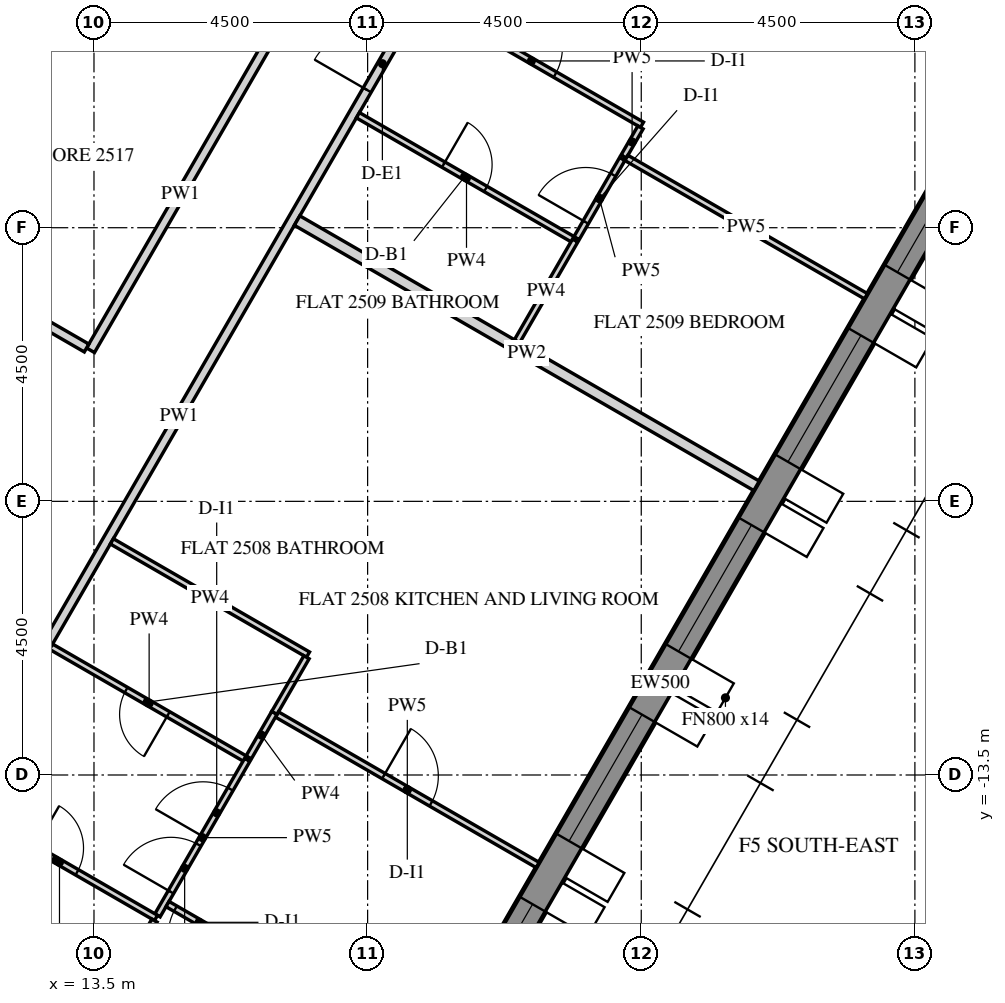
"""IFC4 building model, lengths in metres.
Left out: names, types, materials, properties, quantities, classifications, styles, units other than length and angle.
Written with IfcOpenShell. Run it as: python <this file> out.ifc"""

import sys

from ifc_helpers import new_model, si_unit, direction, frame, frame_2d, origin, place, context, subcontext, project, spatial, polyline, rectangle, outline, extrude, element, fill, save


model = new_model("IFC4")
c1 = context("Model", 3, precision=1e-05, world=origin(), true_north=direction((0.0, 1.0)))
c2 = subcontext(c1, "Body", "Model", "MODEL_VIEW")
j1 = project(units=[si_unit("LENGTHUNIT", "METRE"), si_unit("PLANEANGLEUNIT", "RADIAN")], contexts=[c1])
p1 = place(None, origin())
s1 = spatial("IfcSite", under=j1, at=p1, CompositionType="ELEMENT")
p2 = place(p1, origin())
s2 = spatial("IfcBuilding", under=s1, at=p2, CompositionType="ELEMENT")
p3 = place(p2, frame((0.0, 0.0, 314.7)))
s3 = spatial("IfcBuildingStorey", under=s2, at=p3, CompositionType="ELEMENT", Elevation=314.7)
p4 = place(p3, frame((16.451, -23.005, -0.15), z_axis=(0.0, 0.0, 1.0), x_axis=(0.500003737743, 0.866023245787, 0.0)))
e1 = element("IfcWall", 1, at=p4, inside=s3, PredefinedType="SOLIDWALL", context=c2, shape_type="SweptSolid", body=[
    extrude(outline(polyline([(-0.021, -0.25), (25.468, -0.25), (25.421, 0.25), (0.021, 0.25), (-0.021, -0.25)])), origin(), (0.0, 0.0, 1.0), 3.9),
])
p5 = place(p4, frame((2.522, 0.0, 0.75)))
e2 = element("IfcOpeningElement", 2, at=p5, cuts=e1, PredefinedType="OPENING", context=c2, shape_type="SweptSolid", body=[
    extrude(rectangle(XDim=2.4, YDim=2.7, at=frame_2d((1.2, 1.35))), frame((0.0, 0.26, 0.0), z_axis=(0.0, -1.0, 0.0), x_axis=(1.0, 0.0, 0.0)), (0.0, 0.0, 1.0), 0.52),
])
p6 = place(p4, frame((6.122, 0.0, 0.75)))
e3 = element("IfcOpeningElement", 3, at=p6, cuts=e1, PredefinedType="OPENING", context=c2, shape_type="SweptSolid", body=[
    extrude(rectangle(XDim=2.4, YDim=2.7, at=frame_2d((1.2, 1.35))), frame((0.0, 0.26, 0.0), z_axis=(0.0, -1.0, 0.0), x_axis=(1.0, 0.0, 0.0)), (0.0, 0.0, 1.0), 0.52),
])
p7 = place(p4, frame((9.722, 0.0, 0.75)))
e4 = element("IfcOpeningElement", 4, at=p7, cuts=e1, PredefinedType="OPENING", context=c2, shape_type="SweptSolid", body=[
    extrude(rectangle(XDim=2.4, YDim=2.7, at=frame_2d((1.2, 1.35))), frame((0.0, 0.26, 0.0), z_axis=(0.0, -1.0, 0.0), x_axis=(1.0, 0.0, 0.0)), (0.0, 0.0, 1.0), 0.52),
])
p8 = place(p4, frame((13.323, 0.0, 0.75)))
e5 = element("IfcOpeningElement", 5, at=p8, cuts=e1, PredefinedType="OPENING", context=c2, shape_type="SweptSolid", body=[
    extrude(rectangle(XDim=2.4, YDim=2.7, at=frame_2d((1.2, 1.35))), frame((0.0, 0.26, 0.0), z_axis=(0.0, -1.0, 0.0), x_axis=(1.0, 0.0, 0.0)), (0.0, 0.0, 1.0), 0.52),
])
p9 = place(p4, frame((16.922, 0.0, 0.75)))
e6 = element("IfcOpeningElement", 6, at=p9, cuts=e1, PredefinedType="OPENING", context=c2, shape_type="SweptSolid", body=[
    extrude(rectangle(XDim=2.4, YDim=2.7, at=frame_2d((1.2, 1.35))), frame((0.0, 0.26, 0.0), z_axis=(0.0, -1.0, 0.0), x_axis=(1.0, 0.0, 0.0)), (0.0, 0.0, 1.0), 0.52),
])
p10 = place(p4, frame((20.522, 0.0, 0.75)))
e7 = element("IfcOpeningElement", 7, at=p10, cuts=e1, PredefinedType="OPENING", context=c2, shape_type="SweptSolid", body=[
    extrude(rectangle(XDim=2.4, YDim=2.7, at=frame_2d((1.2, 1.35))), frame((0.0, 0.26, 0.0), z_axis=(0.0, -1.0, 0.0), x_axis=(1.0, 0.0, 0.0)), (0.0, 0.0, 1.0), 0.52),
])
p11 = place(p3, frame((6.351, -11.0, -0.15), z_axis=(0.0, 0.0, 1.0), x_axis=(0.499998894578, -0.866026041999, 0.0)))
e8 = element("IfcWall", 8, at=p11, inside=s3, PredefinedType="SHEAR", context=c2, shape_type="SweptSolid", body=[
    extrude(rectangle(XDim=15.544, YDim=0.4, at=frame_2d((7.772, 0.0))), origin(), (0.0, 0.0, 1.0), 3.9),
])
p12 = place(p11, frame((6.872, 0.0, 0.15)))
e9 = element("IfcOpeningElement", 9, at=p12, cuts=e8, PredefinedType="OPENING", context=c2, shape_type="SweptSolid", body=[
    extrude(rectangle(XDim=1.8, YDim=2.4, at=frame_2d((0.9, 1.2))), frame((0.0, 0.21, 0.0), z_axis=(0.0, -1.0, 0.0), x_axis=(1.0, 0.0, 0.0)), (0.0, 0.0, 1.0), 0.42),
])
p13 = place(p3, frame((11.229, -13.951, 0.0), z_axis=(0.0, 0.0, 1.0), x_axis=(0.499997948852, 0.866026588012, 0.0)))
e10 = element("IfcWall", 10, at=p13, inside=s3, PredefinedType="PARTITIONING", context=c2, shape_type="SweptSolid", body=[
    extrude(rectangle(XDim=14.677, YDim=0.15, at=frame_2d((7.339, 0.0))), origin(), (0.0, 0.0, 1.0), 2.988),
])
p14 = place(p13, frame((1.0, 0.0, 0.0)))
e11 = element("IfcOpeningElement", 11, at=p14, cuts=e10, PredefinedType="OPENING", context=c2, shape_type="SweptSolid", body=[
    extrude(rectangle(XDim=1.0, YDim=2.1, at=frame_2d((0.5, 1.05))), frame((0.0, 0.085, 0.0), z_axis=(0.0, -1.0, 0.0), x_axis=(1.0, 0.0, 0.0)), (0.0, 0.0, 1.0), 0.17),
])
p15 = place(p13, frame((13.527, 0.0, 0.0)))
e12 = element("IfcOpeningElement", 12, at=p15, cuts=e10, PredefinedType="OPENING", context=c2, shape_type="SweptSolid", body=[
    extrude(rectangle(XDim=1.0, YDim=2.1, at=frame_2d((0.5, 1.05))), frame((0.0, 0.085, 0.0), z_axis=(0.0, -1.0, 0.0), x_axis=(1.0, 0.0, 0.0)), (0.0, 0.0, 1.0), 0.17),
])
p16 = place(p3, frame((16.405, -1.386, 0.0), z_axis=(0.0, 0.0, 1.0), x_axis=(-0.500026921216, -0.866009860255, 0.0)))
e13 = element("IfcWall", 13, at=p16, inside=s3, PredefinedType="PARTITIONING", context=c2, shape_type="SweptSolid", body=[
    extrude(rectangle(XDim=5.923, YDim=0.15, at=frame_2d((2.961, 0.0))), origin(), (0.0, 0.0, 1.0), 2.988),
])
p17 = place(p3, frame((13.378, -6.478, 0.0), z_axis=(0.0, 0.0, 1.0), x_axis=(-0.866011265228, 0.500024487898, 0.0)))
e14 = element("IfcWall", 14, at=p17, inside=s3, PredefinedType="PARTITIONING", context=c2, shape_type="SweptSolid", body=[
    extrude(rectangle(XDim=3.825, YDim=0.15, at=frame_2d((1.913, 0.0))), origin(), (0.0, 0.0, 1.0), 2.988),
])
p18 = place(p3, frame((13.794, -9.658, 0.0), z_axis=(0.0, 0.0, 1.0), x_axis=(0.866028424924, -0.499994767197, 0.0)))
e15 = element("IfcWall", 15, at=p18, inside=s3, PredefinedType="PARTITIONING", context=c2, shape_type="SweptSolid", body=[
    extrude(rectangle(XDim=3.725, YDim=0.1, at=frame_2d((1.863, 0.0))), origin(), (0.0, 0.0, 1.0), 2.988),
])
p19 = place(p3, frame((16.995, -11.564, 0.0), z_axis=(0.0, 0.0, 1.0), x_axis=(-0.50002815445, -0.866009148195, 0.0)))
e16 = element("IfcWall", 16, at=p19, inside=s3, PredefinedType="PARTITIONING", context=c2, shape_type="SweptSolid", body=[
    extrude(rectangle(XDim=1.06, YDim=0.1, at=frame_2d((0.53, 0.0))), origin(), (0.0, 0.0, 1.0), 2.988),
])
p20 = place(p3, frame((16.509, -12.505, 0.0), z_axis=(0.0, 0.0, 1.0), x_axis=(0.866018855338, -0.500011342071, 0.0)))
e17 = element("IfcWall", 17, at=p20, inside=s3, PredefinedType="PARTITIONING", context=c2, shape_type="SweptSolid", body=[
    extrude(rectangle(XDim=4.95, YDim=0.1, at=frame_2d((2.475, 0.0))), origin(), (0.0, 0.0, 1.0), 2.988),
])
p21 = place(p20, frame((2.025, 0.0, 0.0)))
e18 = element("IfcOpeningElement", 18, at=p21, cuts=e17, PredefinedType="OPENING", context=c2, shape_type="SweptSolid", body=[
    extrude(rectangle(XDim=0.9, YDim=2.1, at=frame_2d((0.45, 1.05))), frame((0.0, 0.06, 0.0), z_axis=(0.0, -1.0, 0.0), x_axis=(1.0, 0.0, 0.0)), (0.0, 0.0, 1.0), 0.12),
])
p22 = place(p3, frame((24.396, -8.745, 0.0), z_axis=(0.0, 0.0, 1.0), x_axis=(-0.866018297078, 0.500012308975, 0.0)))
e19 = element("IfcWall", 19, at=p22, inside=s3, PredefinedType="PARTITIONING", context=c2, shape_type="SweptSolid", body=[
    extrude(rectangle(XDim=8.725, YDim=0.18, at=frame_2d((4.362, 0.0))), origin(), (0.0, 0.0, 1.0), 2.988),
])
p23 = place(p3, frame((16.02, -13.253, 0.0), z_axis=(0.0, 0.0, 1.0), x_axis=(-0.866028424924, 0.499994767197, 0.0)))
e20 = element("IfcWall", 20, at=p23, inside=s3, PredefinedType="PARTITIONING", context=c2, shape_type="SweptSolid", body=[
    extrude(rectangle(XDim=3.725, YDim=0.1, at=frame_2d((1.863, 0.0))), origin(), (0.0, 0.0, 1.0), 2.988),
])
p24 = place(p23, frame((1.5, 0.0, 0.0)))
e21 = element("IfcOpeningElement", 21, at=p24, cuts=e20, PredefinedType="OPENING", context=c2, shape_type="SweptSolid", body=[
    extrude(rectangle(XDim=0.8, YDim=2.1, at=frame_2d((0.4, 1.05))), frame((0.0, 0.06, 0.0), z_axis=(0.0, -1.0, 0.0), x_axis=(1.0, 0.0, 0.0)), (0.0, 0.0, 1.0), 0.12),
])
p25 = place(p3, frame((14.544, -15.809, 0.0), z_axis=(0.0, 0.0, 1.0), x_axis=(0.500032473623, 0.866006654318, 0.0)))
e22 = element("IfcWall", 22, at=p25, inside=s3, PredefinedType="PARTITIONING", context=c2, shape_type="SweptSolid", body=[
    extrude(rectangle(XDim=2.954, YDim=0.1, at=frame_2d((1.477, 0.0))), origin(), (0.0, 0.0, 1.0), 2.988),
])
p26 = place(p25, frame((0.444, 0.0, 0.0)))
e23 = element("IfcOpeningElement", 23, at=p26, cuts=e22, PredefinedType="OPENING", context=c2, shape_type="SweptSolid", body=[
    extrude(rectangle(XDim=0.9, YDim=2.1, at=frame_2d((0.45, 1.05))), frame((0.0, 0.06, 0.0), z_axis=(0.0, -1.0, 0.0), x_axis=(1.0, 0.0, 0.0)), (0.0, 0.0, 1.0), 0.12),
])
p27 = place(p25, frame((1.498, 0.0, 0.0)))
e24 = element("IfcOpeningElement", 24, at=p27, cuts=e22, PredefinedType="OPENING", context=c2, shape_type="SweptSolid", body=[
    extrude(rectangle(XDim=0.9, YDim=2.1, at=frame_2d((0.45, 1.05))), frame((0.0, 0.06, 0.0), z_axis=(0.0, -1.0, 0.0), x_axis=(1.0, 0.0, 0.0)), (0.0, 0.0, 1.0), 0.12),
])
p28 = place(p3, frame((11.345, -14.018, 0.0), z_axis=(0.0, 0.0, 1.0), x_axis=(0.866050287132, -0.499956898301, 0.0)))
e25 = element("IfcWall", 25, at=p28, inside=s3, PredefinedType="PARTITIONING", context=c2, shape_type="SweptSolid", body=[
    extrude(rectangle(XDim=3.666, YDim=0.1, at=frame_2d((1.833, 0.0))), origin(), (0.0, 0.0, 1.0), 2.988),
])
p29 = place(p28, frame((1.366, 0.0, 0.0)))
e26 = element("IfcOpeningElement", 26, at=p29, cuts=e25, PredefinedType="OPENING", context=c2, shape_type="SweptSolid", body=[
    extrude(rectangle(XDim=0.8, YDim=2.1, at=frame_2d((0.4, 1.05))), frame((0.0, 0.06, 0.0), z_axis=(0.0, -1.0, 0.0), x_axis=(1.0, 0.0, 0.0)), (0.0, 0.0, 1.0), 0.12),
])
p30 = place(p3, frame((16.044, -13.211, 0.0), z_axis=(0.0, 0.0, 1.0), x_axis=(0.499997969693, 0.866026575979, 0.0)))
e27 = element("IfcWall", 27, at=p30, inside=s3, PredefinedType="PARTITIONING", context=c2, shape_type="SweptSolid", body=[
    extrude(rectangle(XDim=0.844, YDim=0.1, at=frame_2d((0.422, 0.0))), origin(), (0.0, 0.0, 1.0), 2.988),
])
p31 = place(p3, frame((18.996, -18.098, 0.0), z_axis=(0.0, 0.0, 1.0), x_axis=(-0.866018855338, 0.500011342071, 0.0)))
e28 = element("IfcWall", 28, at=p31, inside=s3, PredefinedType="PARTITIONING", context=c2, shape_type="SweptSolid", body=[
    extrude(rectangle(XDim=4.95, YDim=0.1, at=frame_2d((2.475, 0.0))), origin(), (0.0, 0.0, 1.0), 2.988),
])
p32 = place(p31, frame((3.9, 0.0, 0.0)))
e29 = element("IfcOpeningElement", 29, at=p32, cuts=e28, PredefinedType="OPENING", context=c2, shape_type="SweptSolid", body=[
    extrude(rectangle(XDim=0.9, YDim=2.1, at=frame_2d((0.45, 1.05))), frame((0.0, 0.06, 0.0), z_axis=(0.0, -1.0, 0.0), x_axis=(1.0, 0.0, 0.0)), (0.0, 0.0, 1.0), 0.12),
])
p33 = place(p3, frame((14.495, -15.894, 0.0), z_axis=(0.0, 0.0, 1.0), x_axis=(-0.500004234368, -0.866022959057, 0.0)))
e30 = element("IfcWall", 30, at=p33, inside=s3, PredefinedType="PARTITIONING", context=c2, shape_type="SweptSolid", body=[
    extrude(rectangle(XDim=1.875, YDim=0.1, at=frame_2d((0.938, 0.0))), origin(), (0.0, 0.0, 1.0), 2.988),
])
p34 = place(p3, frame((17.932, -0.163, 0.0), z_axis=(0.0, 0.0, 1.0), x_axis=(0.866021868245, -0.500006123685, 0.0)))
e31 = element("IfcWall", 31, at=p34, inside=s3, PredefinedType="PARTITIONING", context=c2, shape_type="SweptSolid", body=[
    extrude(rectangle(XDim=5.29, YDim=0.1, at=frame_2d((2.645, 0.0))), origin(), (0.0, 0.0, 1.0), 2.988),
])
p35 = place(p34, frame((2.739, 0.0, 0.0)))
e32 = element("IfcOpeningElement", 32, at=p35, cuts=e31, PredefinedType="OPENING", context=c2, shape_type="SweptSolid", body=[
    extrude(rectangle(XDim=0.9, YDim=2.1, at=frame_2d((0.45, 1.05))), frame((0.0, 0.06, 0.0), z_axis=(0.0, -1.0, 0.0), x_axis=(1.0, 0.0, 0.0)), (0.0, 0.0, 1.0), 0.12),
])
p36 = place(p3, frame((22.487, -2.851, 0.0), z_axis=(0.0, 0.0, 1.0), x_axis=(-0.499850094852, -0.866111934265, 0.0)))
e33 = element("IfcWall", 33, at=p36, inside=s3, PredefinedType="PARTITIONING", context=c2, shape_type="SweptSolid", body=[
    extrude(rectangle(XDim=0.552, YDim=0.1, at=frame_2d((0.276, 0.0))), origin(), (0.0, 0.0, 1.0), 2.988),
])
p37 = place(p3, frame((22.256, -3.352, 0.0), z_axis=(0.0, 0.0, 1.0), x_axis=(0.866012237902, -0.500022803284, 0.0)))
e34 = element("IfcWall", 34, at=p37, inside=s3, PredefinedType="PARTITIONING", context=c2, shape_type="SweptSolid", body=[
    extrude(rectangle(XDim=4.55, YDim=0.1, at=frame_2d((2.275, 0.0))), origin(), (0.0, 0.0, 1.0), 2.988),
])
p38 = place(p3, frame((17.84, -2.65, 0.0), z_axis=(0.0, 0.0, 1.0), x_axis=(0.866019999656, -0.500009360108, 0.0)))
e35 = element("IfcWall", 35, at=p38, inside=s3, PredefinedType="PARTITIONING", context=c2, shape_type="SweptSolid", body=[
    extrude(rectangle(XDim=4.125, YDim=0.1, at=frame_2d((2.062, 0.0))), origin(), (0.0, 0.0, 1.0), 2.988),
])
p39 = place(p38, frame((1.625, 0.0, 0.0)))
e36 = element("IfcOpeningElement", 36, at=p39, cuts=e35, PredefinedType="OPENING", context=c2, shape_type="SweptSolid", body=[
    extrude(rectangle(XDim=0.8, YDim=2.1, at=frame_2d((0.4, 1.05))), frame((0.0, 0.06, 0.0), z_axis=(0.0, -1.0, 0.0), x_axis=(1.0, 0.0, 0.0)), (0.0, 0.0, 1.0), 0.12),
])
p40 = place(p3, frame((21.436, -4.671, 0.0), z_axis=(0.0, 0.0, 1.0), x_axis=(0.499985098601, 0.86603400694, 0.0)))
e37 = element("IfcWall", 37, at=p40, inside=s3, PredefinedType="PARTITIONING", context=c2, shape_type="SweptSolid", body=[
    extrude(rectangle(XDim=1.502, YDim=0.1, at=frame_2d((0.751, 0.0))), origin(), (0.0, 0.0, 1.0), 2.988),
])
p41 = place(p40, frame((0.302, 0.0, 0.0)))
e38 = element("IfcOpeningElement", 38, at=p41, cuts=e37, PredefinedType="OPENING", context=c2, shape_type="SweptSolid", body=[
    extrude(rectangle(XDim=0.9, YDim=2.1, at=frame_2d((0.45, 1.05))), frame((0.0, 0.06, 0.0), z_axis=(0.0, -1.0, 0.0), x_axis=(1.0, 0.0, 0.0)), (0.0, 0.0, 1.0), 0.12),
])
p42 = place(p3, frame((20.457, -6.367, 0.0), z_axis=(0.0, 0.0, 1.0), x_axis=(0.499984020225, 0.866034629516, 0.0)))
e39 = element("IfcWall", 39, at=p42, inside=s3, PredefinedType="PARTITIONING", context=c2, shape_type="SweptSolid", body=[
    extrude(rectangle(XDim=1.912, YDim=0.1, at=frame_2d((0.956, 0.0))), origin(), (0.0, 0.0, 1.0), 2.988),
])
p43 = place(p6, frame((0.0, 0.18, 0.0)))
e40 = element("IfcWindow", 40, at=p43, inside=s3, PartitioningType="DOUBLE_PANEL_VERTICAL", PredefinedType="WINDOW", context=c2, shape_type="SweptSolid", body=[
    extrude(rectangle(XDim=2.4, YDim=2.7, at=frame_2d((1.2, 1.35))), frame((0.0, 0.03, 0.0), z_axis=(0.0, -1.0, 0.0), x_axis=(1.0, 0.0, 0.0)), (0.0, 0.0, 1.0), 0.06),
])
fill(e3, e40)
p44 = place(p7, frame((0.0, 0.18, 0.0)))
e41 = element("IfcWindow", 41, at=p44, inside=s3, PartitioningType="DOUBLE_PANEL_VERTICAL", PredefinedType="WINDOW", context=c2, shape_type="SweptSolid", body=[
    extrude(rectangle(XDim=2.4, YDim=2.7, at=frame_2d((1.2, 1.35))), frame((0.0, 0.03, 0.0), z_axis=(0.0, -1.0, 0.0), x_axis=(1.0, 0.0, 0.0)), (0.0, 0.0, 1.0), 0.06),
])
fill(e4, e41)
p45 = place(p8, frame((0.0, 0.18, 0.0)))
e42 = element("IfcWindow", 42, at=p45, inside=s3, PartitioningType="DOUBLE_PANEL_VERTICAL", PredefinedType="WINDOW", context=c2, shape_type="SweptSolid", body=[
    extrude(rectangle(XDim=2.4, YDim=2.7, at=frame_2d((1.2, 1.35))), frame((0.0, 0.03, 0.0), z_axis=(0.0, -1.0, 0.0), x_axis=(1.0, 0.0, 0.0)), (0.0, 0.0, 1.0), 0.06),
])
fill(e5, e42)
p46 = place(p9, frame((0.0, 0.18, 0.0)))
e43 = element("IfcWindow", 43, at=p46, inside=s3, PartitioningType="DOUBLE_PANEL_VERTICAL", PredefinedType="WINDOW", context=c2, shape_type="SweptSolid", body=[
    extrude(rectangle(XDim=2.4, YDim=2.7, at=frame_2d((1.2, 1.35))), frame((0.0, 0.03, 0.0), z_axis=(0.0, -1.0, 0.0), x_axis=(1.0, 0.0, 0.0)), (0.0, 0.0, 1.0), 0.06),
])
fill(e6, e43)
p47 = place(p10, frame((0.0, 0.18, 0.0)))
e44 = element("IfcWindow", 44, at=p47, inside=s3, PartitioningType="DOUBLE_PANEL_VERTICAL", PredefinedType="WINDOW", context=c2, shape_type="SweptSolid", body=[
    extrude(rectangle(XDim=2.4, YDim=2.7, at=frame_2d((1.2, 1.35))), frame((0.0, 0.03, 0.0), z_axis=(0.0, -1.0, 0.0), x_axis=(1.0, 0.0, 0.0)), (0.0, 0.0, 1.0), 0.06),
])
fill(e7, e44)
p48 = place(p24, origin())
e45 = element("IfcDoor", 45, at=p48, inside=s3, OperationType="SINGLE_SWING_LEFT", PredefinedType="DOOR", context=c2, shape_type="SweptSolid", body=[
    extrude(rectangle(XDim=0.8, YDim=2.1, at=frame_2d((0.4, 1.05))), frame((0.0, 0.025, 0.0), z_axis=(0.0, -1.0, 0.0), x_axis=(1.0, 0.0, 0.0)), (0.0, 0.0, 1.0), 0.05),
])
fill(e21, e45)
p49 = place(p26, origin())
e46 = element("IfcDoor", 46, at=p49, inside=s3, OperationType="SINGLE_SWING_LEFT", PredefinedType="DOOR", context=c2, shape_type="SweptSolid", body=[
    extrude(rectangle(XDim=0.9, YDim=2.1, at=frame_2d((0.45, 1.05))), frame((0.0, 0.025, 0.0), z_axis=(0.0, -1.0, 0.0), x_axis=(1.0, 0.0, 0.0)), (0.0, 0.0, 1.0), 0.05),
])
fill(e23, e46)
p50 = place(p32, origin())
e47 = element("IfcDoor", 47, at=p50, inside=s3, OperationType="SINGLE_SWING_RIGHT", PredefinedType="DOOR", context=c2, shape_type="SweptSolid", body=[
    extrude(rectangle(XDim=0.9, YDim=2.1, at=frame_2d((0.45, 1.05))), frame((0.0, 0.025, 0.0), z_axis=(0.0, -1.0, 0.0), x_axis=(1.0, 0.0, 0.0)), (0.0, 0.0, 1.0), 0.05),
])
fill(e29, e47)
p51 = place(p27, origin())
e48 = element("IfcDoor", 48, at=p51, inside=s3, OperationType="SINGLE_SWING_LEFT", PredefinedType="DOOR", context=c2, shape_type="SweptSolid", body=[
    extrude(rectangle(XDim=0.9, YDim=2.1, at=frame_2d((0.45, 1.05))), frame((0.0, 0.025, 0.0), z_axis=(0.0, -1.0, 0.0), x_axis=(1.0, 0.0, 0.0)), (0.0, 0.0, 1.0), 0.05),
])
fill(e24, e48)
p52 = place(p29, origin())
e49 = element("IfcDoor", 49, at=p52, inside=s3, OperationType="SINGLE_SWING_RIGHT", PredefinedType="DOOR", context=c2, shape_type="SweptSolid", body=[
    extrude(rectangle(XDim=0.8, YDim=2.1, at=frame_2d((0.4, 1.05))), frame((0.0, 0.025, 0.0), z_axis=(0.0, -1.0, 0.0), x_axis=(1.0, 0.0, 0.0)), (0.0, 0.0, 1.0), 0.05),
])
fill(e26, e49)
p53 = place(p15, origin())
e50 = element("IfcDoor", 50, at=p53, inside=s3, OperationType="SINGLE_SWING_LEFT", PredefinedType="DOOR", context=c2, shape_type="SweptSolid", body=[
    extrude(rectangle(XDim=1.0, YDim=2.1, at=frame_2d((0.5, 1.05))), frame((0.0, 0.025, 0.0), z_axis=(0.0, -1.0, 0.0), x_axis=(1.0, 0.0, 0.0)), (0.0, 0.0, 1.0), 0.05),
])
fill(e12, e50)
p54 = place(p39, origin())
e51 = element("IfcDoor", 51, at=p54, inside=s3, OperationType="SINGLE_SWING_RIGHT", PredefinedType="DOOR", context=c2, shape_type="SweptSolid", body=[
    extrude(rectangle(XDim=0.8, YDim=2.1, at=frame_2d((0.4, 1.05))), frame((0.0, 0.025, 0.0), z_axis=(0.0, -1.0, 0.0), x_axis=(1.0, 0.0, 0.0)), (0.0, 0.0, 1.0), 0.05),
])
fill(e36, e51)
p55 = place(p35, origin())
e52 = element("IfcDoor", 52, at=p55, inside=s3, OperationType="SINGLE_SWING_LEFT", PredefinedType="DOOR", context=c2, shape_type="SweptSolid", body=[
    extrude(rectangle(XDim=0.9, YDim=2.1, at=frame_2d((0.45, 1.05))), frame((0.0, 0.025, 0.0), z_axis=(0.0, -1.0, 0.0), x_axis=(1.0, 0.0, 0.0)), (0.0, 0.0, 1.0), 0.05),
])
fill(e32, e52)
p56 = place(p41, origin())
e53 = element("IfcDoor", 53, at=p56, inside=s3, OperationType="SINGLE_SWING_LEFT", PredefinedType="DOOR", context=c2, shape_type="SweptSolid", body=[
    extrude(rectangle(XDim=0.9, YDim=2.1, at=frame_2d((0.45, 1.05))), frame((0.0, 0.025, 0.0), z_axis=(0.0, -1.0, 0.0), x_axis=(1.0, 0.0, 0.0)), (0.0, 0.0, 1.0), 0.05),
])
fill(e38, e53)
p57 = place(p21, origin())
e54 = element("IfcDoor", 54, at=p57, inside=s3, OperationType="SINGLE_SWING_RIGHT", PredefinedType="DOOR", context=c2, shape_type="SweptSolid", body=[
    extrude(rectangle(XDim=0.9, YDim=2.1, at=frame_2d((0.45, 1.05))), frame((0.0, 0.025, 0.0), z_axis=(0.0, -1.0, 0.0), x_axis=(1.0, 0.0, 0.0)), (0.0, 0.0, 1.0), 0.05),
])
fill(e18, e54)
save(model, sys.argv[1])
